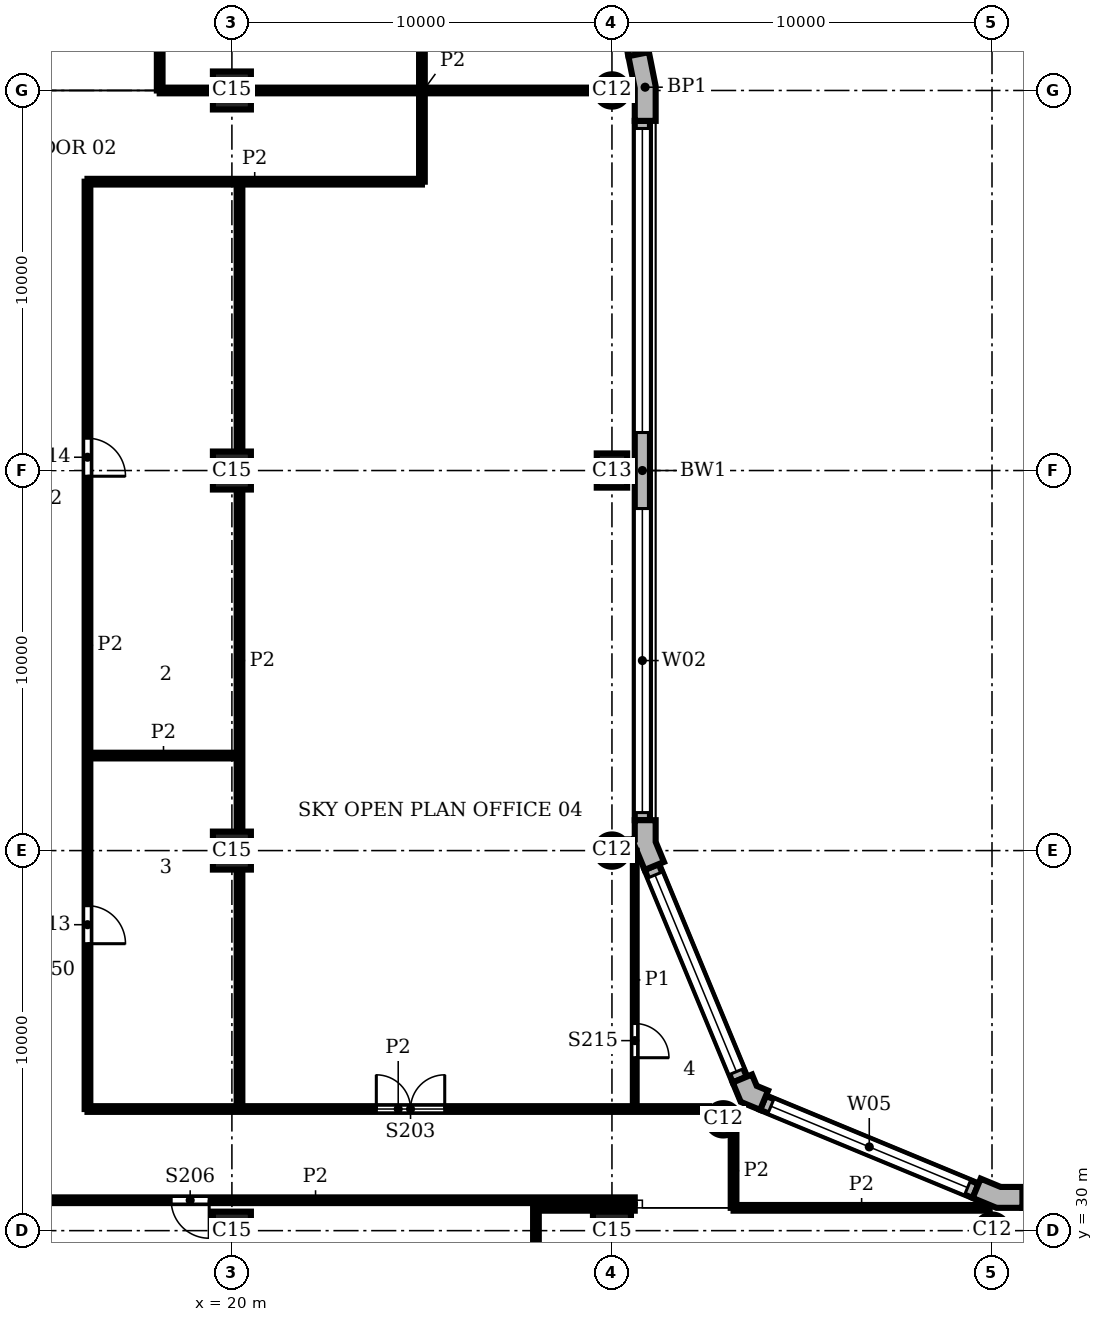
"""IFC4 building model, lengths in metres.
Left out: names, types, materials, properties, quantities, classifications, styles, units other than length and angle.
Written with IfcOpenShell. Run it as: python <this file> out.ifc"""

import sys

from ifc_helpers import new_model, si_unit, direction, frame, frame_2d, origin, origin_2d, place, context, subcontext, project, spatial, polyline, rectangle, circle, outline, extrude, element, fill, save


model = new_model("IFC4")
c1 = context("Model", 3, precision=1e-05, world=origin(), true_north=direction((0.0, 1.0)))
c2 = subcontext(c1, "Body", "Model", "MODEL_VIEW")
j1 = project(units=[si_unit("LENGTHUNIT", "METRE"), si_unit("PLANEANGLEUNIT", "RADIAN")], contexts=[c1])
p1 = place(None, origin())
s1 = spatial("IfcSite", under=j1, at=p1, CompositionType="ELEMENT")
p2 = place(p1, origin())
s2 = spatial("IfcBuilding", under=s1, at=p2, CompositionType="ELEMENT")
p3 = place(p2, frame((0.0, 0.0, 246.0)))
s3 = spatial("IfcBuildingStorey", under=s2, at=p3, CompositionType="ELEMENT", Elevation=246.0)
for number, where, z_axis, x_axis in (
    (1, (40.0, 30.0, 0.0), (0.0, 0.0, 1.0), (1.0, 0.0, 0.0)),
    (2, (32.929, 32.929, 0.0), (0.0, 0.0, 1.0), (1.0, 0.0, 0.0)),
    (3, (30.0, 40.0, 0.0), (0.0, 0.0, 1.0), (1.0, 0.0, 0.0)),
):
    element("IfcColumn", number, at=place(p3, frame(where, z_axis=z_axis, x_axis=x_axis)), inside=s3, PredefinedType="COLUMN", context=c2, shape_type="SweptSolid", body=[
        extrude(circle(Radius=0.425, at=origin_2d()), origin(), (0.0, 0.0, 1.0), 5.4),
    ])
p4 = place(p3, frame((30.0, 50.0, 0.0), z_axis=(0.0, 0.0, 1.0), x_axis=(0.0, 1.0, 0.0)))
e4 = element("IfcColumn", 4, at=p4, inside=s3, PredefinedType="COLUMN", context=c2, shape_type="SweptSolid", body=[
    extrude(rectangle(XDim=0.9, YDim=0.8, at=origin_2d()), origin(), (0.0, 0.0, 1.0), 5.4),
])
p5 = place(p3, frame((30.0, 60.0, 0.0), z_axis=(0.0, 0.0, 1.0), x_axis=(1.0, 0.0, 0.0)))
e5 = element("IfcColumn", 5, at=p5, inside=s3, PredefinedType="COLUMN", context=c2, shape_type="SweptSolid", body=[
    extrude(circle(Radius=0.425, at=origin_2d()), origin(), (0.0, 0.0, 1.0), 5.4),
])
for number, where, z_axis, x_axis in (
    (6, (20.0, 30.0, 0.0), (0.0, 0.0, 1.0), (1.0, 0.0, 0.0)),
    (7, (20.0, 40.0, 0.0), (0.0, 0.0, 1.0), (1.0, 0.0, 0.0)),
    (8, (20.0, 50.0, 0.0), (0.0, 0.0, 1.0), (1.0, 0.0, 0.0)),
    (9, (20.0, 60.0, 0.0), (0.0, 0.0, 1.0), (1.0, 0.0, 0.0)),
    (10, (30.0, 30.0, 0.0), (0.0, 0.0, 1.0), (1.0, 0.0, 0.0)),
):
    element("IfcColumn", number, at=place(p3, frame(where, z_axis=z_axis, x_axis=x_axis)), inside=s3, PredefinedType="COLUMN", context=c2, shape_type="SweptSolid", body=[
        extrude(rectangle(XDim=1.0, YDim=1.0, at=origin_2d()), origin(), (0.0, 0.0, 1.0), 5.4),
    ])
p6 = place(p3, origin())
e11 = element("IfcWall", 11, at=p6, inside=s3, PredefinedType="SOLIDWALL", context=c2, shape_type="SweptSolid", body=[
    extrude(outline(polyline([(40.8, 31.0), (40.8, 31.15), (40.229, 31.15), (39.701, 31.369), (39.644, 31.23), (39.49, 30.861), (40.119, 30.6), (40.8, 30.6), (40.8, 31.0)])), origin(), (0.0, 0.0, 1.0), 5.4),
])
e12 = element("IfcWall", 12, at=p6, inside=s3, PredefinedType="SOLIDWALL", context=c2, shape_type="SweptSolid", body=[
    extrude(outline(polyline([(34.051, 33.547), (34.108, 33.685), (33.809, 33.809), (33.685, 34.108), (33.547, 34.051), (33.177, 33.898), (33.388, 33.388), (33.898, 33.177), (34.051, 33.547)])), origin(), (0.0, 0.0, 1.0), 5.4),
])
e13 = element("IfcWall", 13, at=p6, inside=s3, PredefinedType="SOLIDWALL", context=c2, shape_type="SweptSolid", body=[
    extrude(outline(polyline([(30.62, 39.995), (30.62, 40.071), (30.861, 39.49), (31.23, 39.644), (31.369, 39.701), (31.15, 40.229), (31.15, 40.8), (31.0, 40.8), (30.6, 40.8), (30.6, 40.295), (30.425, 40.295), (30.425, 39.995), (30.62, 39.995)])), origin(), (0.0, 0.0, 1.0), 5.4),
])
e14 = element("IfcWall", 14, at=p6, inside=s3, PredefinedType="SOLIDWALL", context=c2, shape_type="SweptSolid", body=[
    extrude(outline(polyline([(31.0, 59.2), (31.15, 59.2), (31.15, 60.113), (30.972, 61.009), (30.825, 60.98), (30.432, 60.902), (30.6, 60.059), (30.6, 59.2), (31.0, 59.2)])), origin(), (0.0, 0.0, 1.0), 5.4),
])
p7 = place(p3, frame((49.2, 30.8, 0.0), z_axis=(0.0, 0.0, 1.0), x_axis=(-1.0, 0.0, 0.0)))
e15 = element("IfcWall", 15, at=p7, inside=s3, PredefinedType="SOLIDWALL", context=c2, shape_type="SweptSolid", body=[
    extrude(rectangle(XDim=8.4, YDim=0.4, at=frame_2d((4.2, 0.0))), origin(), (0.0, 0.0, 1.0), 5.4),
])
p8 = place(p7, frame((0.2, 0.0, 0.9)))
e16 = element("IfcOpeningElement", 16, at=p8, cuts=e15, PredefinedType="OPENING", context=c2, shape_type="SweptSolid", body=[
    extrude(rectangle(XDim=8.0, YDim=3.4, at=frame_2d((4.0, 1.7))), frame((0.0, 0.21, 0.0), z_axis=(0.0, -1.0, 0.0), x_axis=(1.0, 0.0, 0.0)), (0.0, 0.0, 1.0), 0.42),
])
p9 = place(p3, frame((39.567, 31.045, 0.0), z_axis=(0.0, 0.0, 1.0), x_axis=(-0.923891000409, 0.382655745237, 0.0)))
e17 = element("IfcWall", 17, at=p9, inside=s3, PredefinedType="SOLIDWALL", context=c2, shape_type="SweptSolid", body=[
    extrude(rectangle(XDim=6.053, YDim=0.4, at=frame_2d((3.027, 0.0))), origin(), (0.0, 0.0, 1.0), 5.4),
])
p10 = place(p9, frame((0.227, 0.0, 0.9)))
e18 = element("IfcOpeningElement", 18, at=p10, cuts=e17, PredefinedType="OPENING", context=c2, shape_type="SweptSolid", body=[
    extrude(rectangle(XDim=5.6, YDim=3.4, at=frame_2d((2.8, 1.7))), frame((0.0, 0.21, 0.0), z_axis=(0.0, -1.0, 0.0), x_axis=(1.0, 0.0, 0.0)), (0.0, 0.0, 1.0), 0.42),
])
p11 = place(p3, frame((33.362, 33.974, 0.0), z_axis=(0.0, 0.0, 1.0), x_axis=(-0.382655745237, 0.923891000409, 0.0)))
e19 = element("IfcWall", 19, at=p11, inside=s3, PredefinedType="SOLIDWALL", context=c2, shape_type="SweptSolid", body=[
    extrude(rectangle(XDim=6.053, YDim=0.4, at=frame_2d((3.027, 0.0))), origin(), (0.0, 0.0, 1.0), 5.4),
])
p12 = place(p11, frame((0.227, 0.0, 0.9)))
e20 = element("IfcOpeningElement", 20, at=p12, cuts=e19, PredefinedType="OPENING", context=c2, shape_type="SweptSolid", body=[
    extrude(rectangle(XDim=5.6, YDim=3.4, at=frame_2d((2.8, 1.7))), frame((0.0, 0.21, 0.0), z_axis=(0.0, -1.0, 0.0), x_axis=(1.0, 0.0, 0.0)), (0.0, 0.0, 1.0), 0.42),
])
p13 = place(p3, frame((30.8, 40.8, 0.0), z_axis=(0.0, 0.0, 1.0), x_axis=(0.0, 1.0, 0.0)))
e21 = element("IfcWall", 21, at=p13, inside=s3, PredefinedType="SOLIDWALL", context=c2, shape_type="SweptSolid", body=[
    extrude(rectangle(XDim=18.4, YDim=0.4, at=frame_2d((9.2, 0.0))), origin(), (0.0, 0.0, 1.0), 5.4),
])
p14 = place(p13, frame((0.2, 0.0, 0.9)))
e22 = element("IfcOpeningElement", 22, at=p14, cuts=e21, PredefinedType="OPENING", context=c2, shape_type="SweptSolid", body=[
    extrude(rectangle(XDim=8.0, YDim=3.4, at=frame_2d((4.0, 1.7))), frame((0.0, 0.21, 0.0), z_axis=(0.0, -1.0, 0.0), x_axis=(1.0, 0.0, 0.0)), (0.0, 0.0, 1.0), 0.42),
])
p15 = place(p13, frame((10.2, 0.0, 0.9)))
e23 = element("IfcOpeningElement", 23, at=p15, cuts=e21, PredefinedType="OPENING", context=c2, shape_type="SweptSolid", body=[
    extrude(rectangle(XDim=8.0, YDim=3.4, at=frame_2d((4.0, 1.7))), frame((0.0, 0.21, 0.0), z_axis=(0.0, -1.0, 0.0), x_axis=(1.0, 0.0, 0.0)), (0.0, 0.0, 1.0), 0.42),
])
p16 = place(p3, frame((30.629, 60.941, 0.0), z_axis=(0.0, 0.0, 1.0), x_axis=(-0.195098533057, 0.98078364709, 0.0)))
e24 = element("IfcWall", 24, at=p16, inside=s3, PredefinedType="SOLIDWALL", context=c2, shape_type="SweptSolid", body=[
    extrude(rectangle(XDim=4.753, YDim=0.4, at=frame_2d((2.376, 0.0))), origin(), (0.0, 0.0, 1.0), 5.4),
])
p17 = place(p16, frame((0.226, 0.0, 0.9)))
e25 = element("IfcOpeningElement", 25, at=p17, cuts=e24, PredefinedType="OPENING", context=c2, shape_type="SweptSolid", body=[
    extrude(rectangle(XDim=4.3, YDim=3.4, at=frame_2d((2.15, 1.7))), frame((0.0, 0.21, 0.0), z_axis=(0.0, -1.0, 0.0), x_axis=(1.0, 0.0, 0.0)), (0.0, 0.0, 1.0), 0.42),
])
p18 = place(p3, frame((30.6, 33.2, 0.0), z_axis=(0.0, 0.0, 1.0), x_axis=(0.0, 1.0, 0.0)))
e26 = element("IfcWall", 26, at=p18, inside=s3, PredefinedType="PARTITIONING", context=c2, shape_type="SweptSolid", body=[
    extrude(rectangle(XDim=6.795, YDim=0.1, at=frame_2d((3.397, 0.0))), origin(), (0.0, 0.0, 1.0), 5.08),
])
p19 = place(p18, frame((1.35, 0.0, 0.0)))
e27 = element("IfcOpeningElement", 27, at=p19, cuts=e26, PredefinedType="OPENING", context=c2, shape_type="SweptSolid", body=[
    extrude(rectangle(XDim=0.9, YDim=2.1, at=frame_2d((0.45, 1.05))), frame((0.0, 0.06, 0.0), z_axis=(0.0, -1.0, 0.0), x_axis=(1.0, 0.0, 0.0)), (0.0, 0.0, 1.0), 0.12),
])
p20 = place(p3, frame((16.2, 33.2, 0.0), z_axis=(0.0, 0.0, 1.0), x_axis=(0.0, 1.0, 0.0)))
e28 = element("IfcWall", 28, at=p20, inside=s3, PredefinedType="PARTITIONING", context=c2, shape_type="SweptSolid", body=[
    extrude(rectangle(XDim=24.4, YDim=0.15, at=frame_2d((12.2, 0.0))), origin(), (0.0, 0.0, 1.0), 5.08),
])
p21 = place(p20, frame((4.35, 0.0, 0.0)))
e29 = element("IfcOpeningElement", 29, at=p21, cuts=e28, PredefinedType="OPENING", context=c2, shape_type="SweptSolid", body=[
    extrude(rectangle(XDim=1.0, YDim=2.1, at=frame_2d((0.5, 1.05))), frame((0.0, 0.085, 0.0), z_axis=(0.0, -1.0, 0.0), x_axis=(1.0, 0.0, 0.0)), (0.0, 0.0, 1.0), 0.17),
])
p22 = place(p20, frame((16.65, 0.0, 0.0)))
e30 = element("IfcOpeningElement", 30, at=p22, cuts=e28, PredefinedType="OPENING", context=c2, shape_type="SweptSolid", body=[
    extrude(rectangle(XDim=1.0, YDim=2.1, at=frame_2d((0.5, 1.05))), frame((0.0, 0.085, 0.0), z_axis=(0.0, -1.0, 0.0), x_axis=(1.0, 0.0, 0.0)), (0.0, 0.0, 1.0), 0.17),
])
p23 = place(p3, frame((18.1, 60.0, 0.0), z_axis=(0.0, 0.0, 1.0), x_axis=(0.0, 1.0, 0.0)))
e31 = element("IfcWall", 31, at=p23, inside=s3, PredefinedType="PARTITIONING", context=c2, shape_type="SweptSolid", body=[
    extrude(rectangle(XDim=6.4, YDim=0.15, at=frame_2d((3.2, 0.0))), origin(), (0.0, 0.0, 1.0), 5.08),
])
p24 = place(p23, frame((3.1, 0.0, 0.0)))
e32 = element("IfcOpeningElement", 32, at=p24, cuts=e31, PredefinedType="OPENING", context=c2, shape_type="SweptSolid", body=[
    extrude(rectangle(XDim=1.0, YDim=2.1, at=frame_2d((0.5, 1.05))), frame((0.0, 0.085, 0.0), z_axis=(0.0, -1.0, 0.0), x_axis=(1.0, 0.0, 0.0)), (0.0, 0.0, 1.0), 0.17),
])
p25 = place(p3, frame((20.2, 33.2, 0.0), z_axis=(0.0, 0.0, 1.0), x_axis=(0.0, 1.0, 0.0)))
e33 = element("IfcWall", 33, at=p25, inside=s3, PredefinedType="PARTITIONING", context=c2, shape_type="SweptSolid", body=[
    extrude(rectangle(XDim=6.3, YDim=0.15, at=frame_2d((3.15, 0.0))), origin(), (0.0, 0.0, 1.0), 5.08),
])
p26 = place(p3, frame((20.2, 40.5, 0.0), z_axis=(0.0, 0.0, 1.0), x_axis=(0.0, 1.0, 0.0)))
e34 = element("IfcWall", 34, at=p26, inside=s3, PredefinedType="PARTITIONING", context=c2, shape_type="SweptSolid", body=[
    extrude(rectangle(XDim=9.0, YDim=0.15, at=frame_2d((4.5, 0.0))), origin(), (0.0, 0.0, 1.0), 5.08),
])
p27 = place(p3, frame((20.2, 50.5, 0.0), z_axis=(0.0, 0.0, 1.0), x_axis=(0.0, 1.0, 0.0)))
e35 = element("IfcWall", 35, at=p27, inside=s3, PredefinedType="PARTITIONING", context=c2, shape_type="SweptSolid", body=[
    extrude(rectangle(XDim=7.1, YDim=0.15, at=frame_2d((3.55, 0.0))), origin(), (0.0, 0.0, 1.0), 5.08),
])
p28 = place(p3, frame((25.0, 57.6, 0.0), z_axis=(0.0, 0.0, 1.0), x_axis=(0.0, 1.0, 0.0)))
e36 = element("IfcWall", 36, at=p28, inside=s3, PredefinedType="PARTITIONING", context=c2, shape_type="SweptSolid", body=[
    extrude(rectangle(XDim=10.4, YDim=0.15, at=frame_2d((5.2, 0.0))), origin(), (0.0, 0.0, 1.0), 5.08),
])
p29 = place(p3, frame((28.0, 28.0, 0.0), z_axis=(0.0, 0.0, 1.0), x_axis=(0.0, 1.0, 0.0)))
e37 = element("IfcWall", 37, at=p29, inside=s3, PredefinedType="PARTITIONING", context=c2, shape_type="SweptSolid", body=[
    extrude(rectangle(XDim=2.598, YDim=0.15, at=frame_2d((1.299, 0.0))), origin(), (0.0, 0.0, 1.0), 5.08),
])
p30 = place(p3, frame((33.2, 30.6, 0.0), z_axis=(0.0, 0.0, 1.0), x_axis=(0.0, 1.0, 0.0)))
e38 = element("IfcWall", 38, at=p30, inside=s3, PredefinedType="PARTITIONING", context=c2, shape_type="SweptSolid", body=[
    extrude(rectangle(XDim=1.952, YDim=0.15, at=frame_2d((0.976, 0.0))), origin(), (0.0, 0.0, 1.0), 5.08),
])
p31 = place(p3, frame((28.002, 30.6, 0.0), z_axis=(0.0, 0.0, 1.0), x_axis=(1.0, 0.0, 0.0)))
e39 = element("IfcWall", 39, at=p31, inside=s3, PredefinedType="PARTITIONING", context=c2, shape_type="SweptSolid", body=[
    extrude(rectangle(XDim=2.598, YDim=0.15, at=frame_2d((1.299, 0.0))), origin(), (0.0, 0.0, 1.0), 5.08),
])
p32 = place(p3, frame((33.2, 30.6, 0.0), z_axis=(0.0, 0.0, 1.0), x_axis=(1.0, 0.0, 0.0)))
e40 = element("IfcWall", 40, at=p32, inside=s3, PredefinedType="PARTITIONING", context=c2, shape_type="SweptSolid", body=[
    extrude(rectangle(XDim=6.738, YDim=0.15, at=frame_2d((3.369, 0.0))), origin(), (0.0, 0.0, 1.0), 5.08),
])
p33 = place(p3, frame((13.802, 30.8, 0.0), z_axis=(0.0, 0.0, 1.0), x_axis=(1.0, 0.0, 0.0)))
e41 = element("IfcWall", 41, at=p33, inside=s3, PredefinedType="PARTITIONING", context=c2, shape_type="SweptSolid", body=[
    extrude(rectangle(XDim=16.798, YDim=0.15, at=frame_2d((8.399, 0.0))), origin(), (0.0, 0.0, 1.0), 5.08),
])
p34 = place(p33, frame((4.6, 0.0, 0.0)))
e42 = element("IfcOpeningElement", 42, at=p34, cuts=e41, PredefinedType="OPENING", context=c2, shape_type="SweptSolid", body=[
    extrude(rectangle(XDim=1.0, YDim=2.1, at=frame_2d((0.5, 1.05))), frame((0.0, 0.085, 0.0), z_axis=(0.0, -1.0, 0.0), x_axis=(1.0, 0.0, 0.0)), (0.0, 0.0, 1.0), 0.17),
])
p35 = place(p3, frame((16.2, 33.2, 0.0), z_axis=(0.0, 0.0, 1.0), x_axis=(1.0, 0.0, 0.0)))
e43 = element("IfcWall", 43, at=p35, inside=s3, PredefinedType="PARTITIONING", context=c2, shape_type="SweptSolid", body=[
    extrude(rectangle(XDim=16.352, YDim=0.15, at=frame_2d((8.176, 0.0))), origin(), (0.0, 0.0, 1.0), 5.08),
])
p36 = place(p35, frame((7.6, 0.0, 0.0)))
e44 = element("IfcOpeningElement", 44, at=p36, cuts=e43, PredefinedType="OPENING", context=c2, shape_type="SweptSolid", body=[
    extrude(rectangle(XDim=1.8, YDim=2.1, at=frame_2d((0.9, 1.05))), frame((0.0, 0.085, 0.0), z_axis=(0.0, -1.0, 0.0), x_axis=(1.0, 0.0, 0.0)), (0.0, 0.0, 1.0), 0.17),
])
p37 = place(p3, frame((16.2, 42.5, 0.0), z_axis=(0.0, 0.0, 1.0), x_axis=(1.0, 0.0, 0.0)))
e45 = element("IfcWall", 45, at=p37, inside=s3, PredefinedType="PARTITIONING", context=c2, shape_type="SweptSolid", body=[
    extrude(rectangle(XDim=4.0, YDim=0.15, at=frame_2d((2.0, 0.0))), origin(), (0.0, 0.0, 1.0), 5.08),
])
p38 = place(p3, frame((16.2, 57.6, 0.0), z_axis=(0.0, 0.0, 1.0), x_axis=(1.0, 0.0, 0.0)))
e46 = element("IfcWall", 46, at=p38, inside=s3, PredefinedType="PARTITIONING", context=c2, shape_type="SweptSolid", body=[
    extrude(rectangle(XDim=8.8, YDim=0.15, at=frame_2d((4.4, 0.0))), origin(), (0.0, 0.0, 1.0), 5.08),
])
p39 = place(p3, frame((18.1, 60.0, 0.0), z_axis=(0.0, 0.0, 1.0), x_axis=(1.0, 0.0, 0.0)))
e47 = element("IfcWall", 47, at=p39, inside=s3, PredefinedType="PARTITIONING", context=c2, shape_type="SweptSolid", body=[
    extrude(rectangle(XDim=1.4, YDim=0.15, at=frame_2d((0.7, 0.0))), origin(), (0.0, 0.0, 1.0), 5.08),
])
p40 = place(p3, frame((20.5, 60.0, 0.0), z_axis=(0.0, 0.0, 1.0), x_axis=(1.0, 0.0, 0.0)))
e48 = element("IfcWall", 48, at=p40, inside=s3, PredefinedType="PARTITIONING", context=c2, shape_type="SweptSolid", body=[
    extrude(rectangle(XDim=9.075, YDim=0.15, at=frame_2d((4.538, 0.0))), origin(), (0.0, 0.0, 1.0), 5.08),
])
p41 = place(p10, origin())
e49 = element("IfcWindow", 49, at=p41, inside=s3, PartitioningType="SINGLE_PANEL", PredefinedType="WINDOW", context=c2, shape_type="SweptSolid", body=[
    extrude(rectangle(XDim=5.6, YDim=3.4, at=frame_2d((2.8, 1.7))), frame((0.0, 0.16, 0.0), z_axis=(0.0, -1.0, 0.0), x_axis=(1.0, 0.0, 0.0)), (0.0, 0.0, 1.0), 0.06),
])
fill(e18, e49)
p42 = place(p12, origin())
e50 = element("IfcWindow", 50, at=p42, inside=s3, PartitioningType="SINGLE_PANEL", PredefinedType="WINDOW", context=c2, shape_type="SweptSolid", body=[
    extrude(rectangle(XDim=5.6, YDim=3.4, at=frame_2d((2.8, 1.7))), frame((0.0, 0.16, 0.0), z_axis=(0.0, -1.0, 0.0), x_axis=(1.0, 0.0, 0.0)), (0.0, 0.0, 1.0), 0.06),
])
fill(e20, e50)
p43 = place(p14, origin())
e51 = element("IfcWindow", 51, at=p43, inside=s3, PartitioningType="SINGLE_PANEL", PredefinedType="WINDOW", context=c2, shape_type="SweptSolid", body=[
    extrude(rectangle(XDim=8.0, YDim=3.4, at=frame_2d((4.0, 1.7))), frame((0.0, 0.16, 0.0), z_axis=(0.0, -1.0, 0.0), x_axis=(1.0, 0.0, 0.0)), (0.0, 0.0, 1.0), 0.06),
])
fill(e22, e51)
p44 = place(p15, origin())
e52 = element("IfcWindow", 52, at=p44, inside=s3, PartitioningType="SINGLE_PANEL", PredefinedType="WINDOW", context=c2, shape_type="SweptSolid", body=[
    extrude(rectangle(XDim=8.0, YDim=3.4, at=frame_2d((4.0, 1.7))), frame((0.0, 0.16, 0.0), z_axis=(0.0, -1.0, 0.0), x_axis=(1.0, 0.0, 0.0)), (0.0, 0.0, 1.0), 0.06),
])
fill(e23, e52)
p45 = place(p36, origin())
e53 = element("IfcDoor", 53, at=p45, inside=s3, OperationType="DOUBLE_DOOR_SINGLE_SWING", PredefinedType="DOOR", context=c2, shape_type="SweptSolid", body=[
    extrude(rectangle(XDim=1.8, YDim=2.1, at=frame_2d((0.9, 1.05))), frame((0.0, 0.025, 0.0), z_axis=(0.0, -1.0, 0.0), x_axis=(1.0, 0.0, 0.0)), (0.0, 0.0, 1.0), 0.05),
])
fill(e44, e53)
p46 = place(p34, frame((1.0, 0.0, 0.0), z_axis=(0.0, 0.0, 1.0), x_axis=(-1.0, 0.0, 0.0)))
e54 = element("IfcDoor", 54, at=p46, inside=s3, OperationType="SINGLE_SWING_LEFT", PredefinedType="DOOR", context=c2, shape_type="SweptSolid", body=[
    extrude(rectangle(XDim=1.0, YDim=2.1, at=frame_2d((0.5, 1.05))), frame((0.0, 0.025, 0.0), z_axis=(0.0, -1.0, 0.0), x_axis=(1.0, 0.0, 0.0)), (0.0, 0.0, 1.0), 0.05),
])
fill(e42, e54)
p47 = place(p21, frame((1.0, 0.0, 0.0), z_axis=(0.0, 0.0, 1.0), x_axis=(-1.0, 0.0, 0.0)))
e55 = element("IfcDoor", 55, at=p47, inside=s3, OperationType="SINGLE_SWING_RIGHT", PredefinedType="DOOR", context=c2, shape_type="SweptSolid", body=[
    extrude(rectangle(XDim=1.0, YDim=2.1, at=frame_2d((0.5, 1.05))), frame((0.0, 0.025, 0.0), z_axis=(0.0, -1.0, 0.0), x_axis=(1.0, 0.0, 0.0)), (0.0, 0.0, 1.0), 0.05),
])
fill(e29, e55)
p48 = place(p22, frame((1.0, 0.0, 0.0), z_axis=(0.0, 0.0, 1.0), x_axis=(-1.0, 0.0, 0.0)))
e56 = element("IfcDoor", 56, at=p48, inside=s3, OperationType="SINGLE_SWING_RIGHT", PredefinedType="DOOR", context=c2, shape_type="SweptSolid", body=[
    extrude(rectangle(XDim=1.0, YDim=2.1, at=frame_2d((0.5, 1.05))), frame((0.0, 0.025, 0.0), z_axis=(0.0, -1.0, 0.0), x_axis=(1.0, 0.0, 0.0)), (0.0, 0.0, 1.0), 0.05),
])
fill(e30, e56)
p49 = place(p19, frame((0.9, 0.0, 0.0), z_axis=(0.0, 0.0, 1.0), x_axis=(-1.0, 0.0, 0.0)))
e57 = element("IfcDoor", 57, at=p49, inside=s3, OperationType="SINGLE_SWING_RIGHT", PredefinedType="DOOR", context=c2, shape_type="SweptSolid", body=[
    extrude(rectangle(XDim=0.9, YDim=2.1, at=frame_2d((0.45, 1.05))), frame((0.0, 0.025, 0.0), z_axis=(0.0, -1.0, 0.0), x_axis=(1.0, 0.0, 0.0)), (0.0, 0.0, 1.0), 0.05),
])
fill(e27, e57)
save(model, sys.argv[1])
